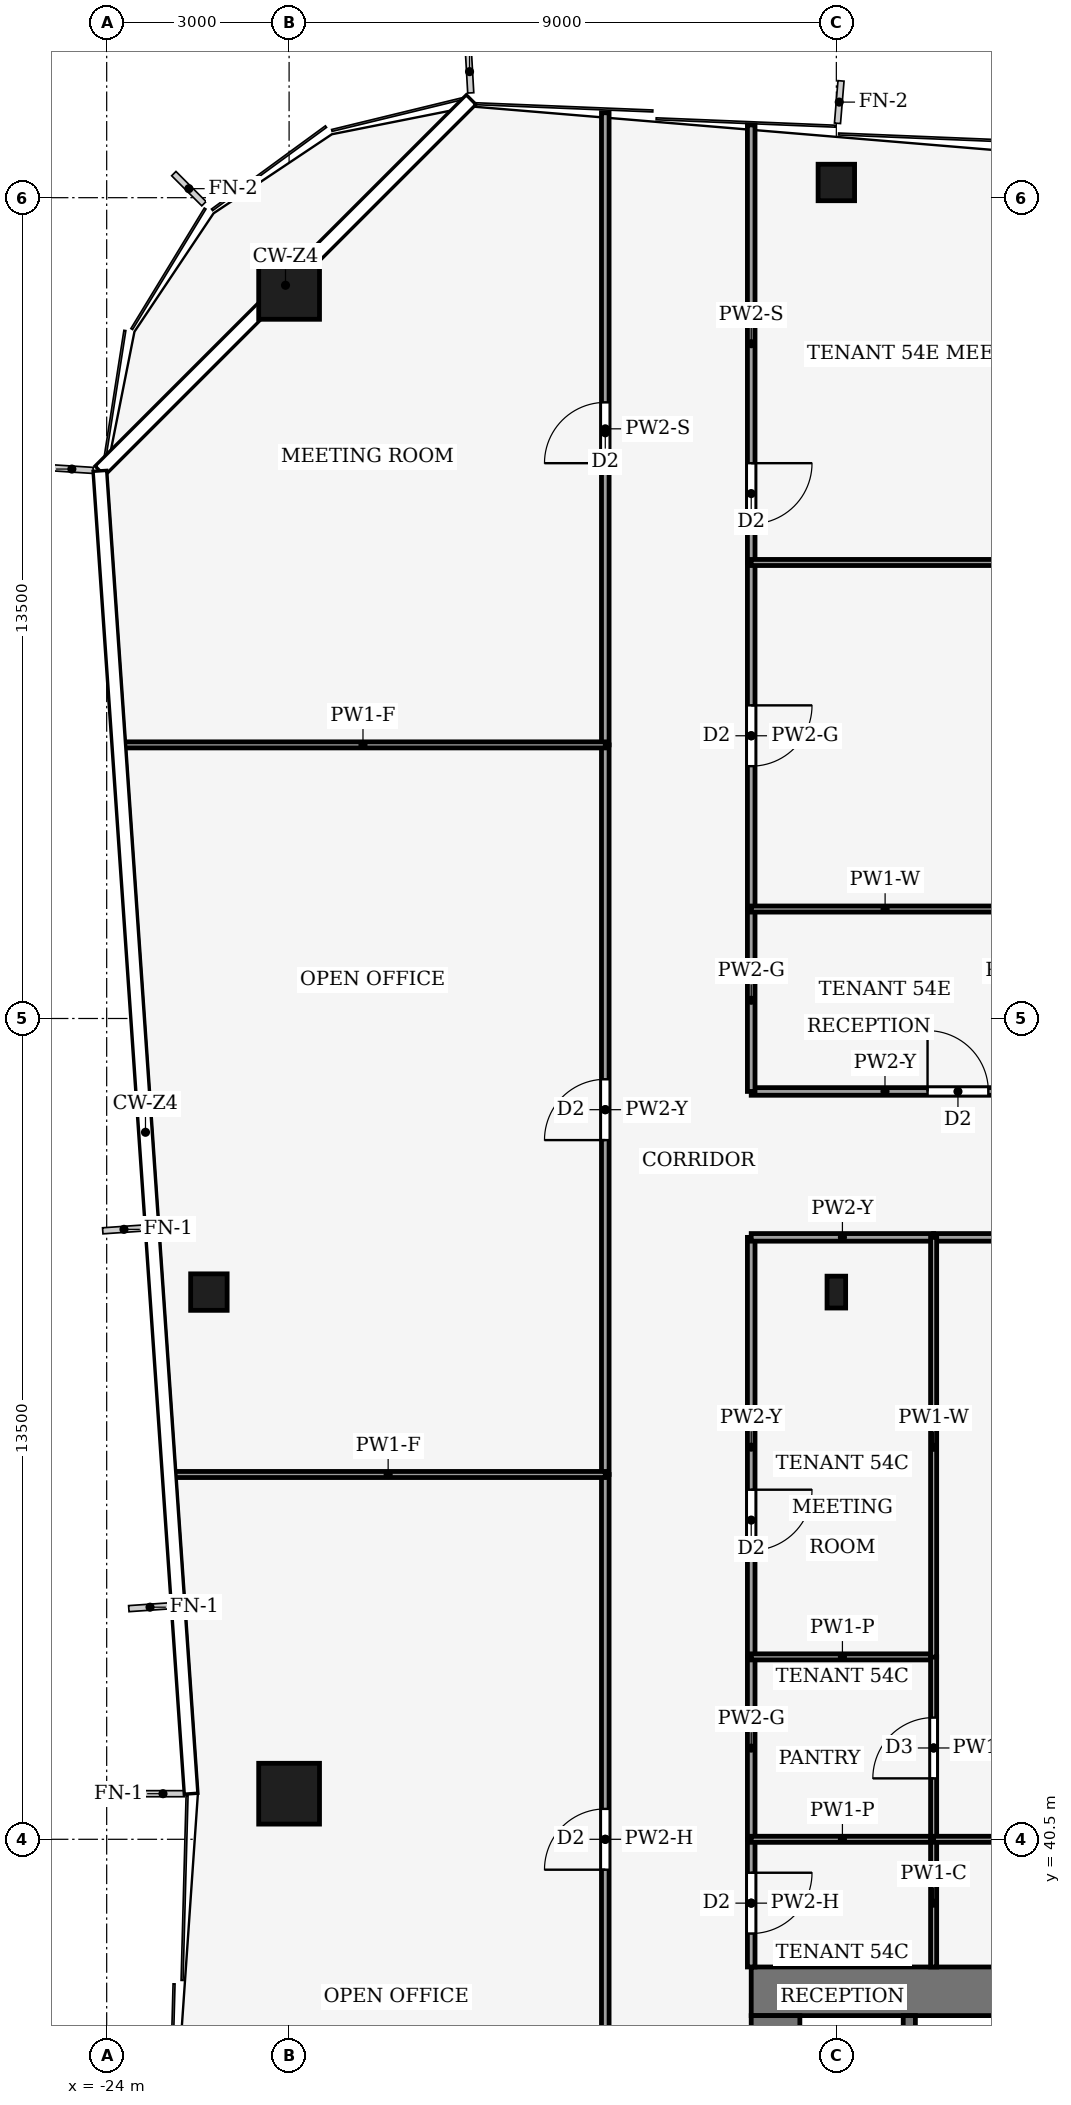
"""IFC4 building model, lengths in metres.
Left out: names, types, materials, properties, quantities, classifications, styles, units other than length and angle.
Written with IfcOpenShell. Run it as: python <this file> out.ifc"""

import sys

from ifc_helpers import new_model, si_unit, direction, frame, frame_2d, origin, origin_2d, place, context, subcontext, project, spatial, rectangle, hollow_rectangle, i_section, extrude, element, fill, save


model = new_model("IFC4")
c1 = context("Model", 3, precision=1e-05, world=origin(), true_north=direction((0.0, 1.0)))
c2 = subcontext(c1, "Body", "Model", "MODEL_VIEW")
j1 = project(units=[si_unit("LENGTHUNIT", "METRE"), si_unit("PLANEANGLEUNIT", "RADIAN")], contexts=[c1])
p1 = place(None, origin())
s1 = spatial("IfcSite", under=j1, at=p1, CompositionType="ELEMENT")
p2 = place(p1, origin())
s2 = spatial("IfcBuilding", under=s1, at=p2, CompositionType="ELEMENT")
p3 = place(p2, frame((0.0, 0.0, 238.0)))
s3 = spatial("IfcBuildingStorey", under=s2, at=p3, CompositionType="ELEMENT", Elevation=238.0)
p4 = place(p3, frame((-13.4, 38.0, -0.13), z_axis=(0.0, 0.0, 1.0), x_axis=(1.0, 0.0, 0.0)))
e1 = element("IfcWall", 1, at=p4, inside=s3, PredefinedType="SHEAR", context=c2, shape_type="SweptSolid", body=[
    extrude(rectangle(XDim=26.8, YDim=0.8, at=frame_2d((13.4, 0.0))), origin(), (0.0, 0.0, 1.0), 4.0),
])
p5 = place(p3, frame((-13.0, 18.4, -0.13), z_axis=(0.0, 0.0, 1.0), x_axis=(0.0, 1.0, 0.0)))
e2 = element("IfcWall", 2, at=p5, inside=s3, PredefinedType="SHEAR", context=c2, shape_type="SweptSolid", body=[
    extrude(rectangle(XDim=19.2, YDim=0.8, at=frame_2d((9.6, 0.0))), origin(), (0.0, 0.0, 1.0), 4.0),
])
p6 = place(p5, frame((2.8, 0.0, 0.13)))
e3 = element("IfcOpeningElement", 3, at=p6, cuts=e2, PredefinedType="OPENING", context=c2, shape_type="SweptSolid", body=[
    extrude(rectangle(XDim=2.4, YDim=2.4, at=frame_2d((1.2, 1.2))), frame((0.0, 0.41, 0.0), z_axis=(0.0, -1.0, 0.0), x_axis=(1.0, 0.0, 0.0)), (0.0, 0.0, 1.0), 0.82),
])
p7 = place(p5, frame((13.4, 0.0, 0.13)))
e4 = element("IfcOpeningElement", 4, at=p7, cuts=e2, PredefinedType="OPENING", context=c2, shape_type="SweptSolid", body=[
    extrude(rectangle(XDim=1.4, YDim=2.2, at=frame_2d((0.7, 1.1))), frame((0.0, 0.41, 0.0), z_axis=(0.0, -1.0, 0.0), x_axis=(1.0, 0.0, 0.0)), (0.0, 0.0, 1.0), 0.82),
])
for number, where, z_axis, x_axis in (
    (5, (-21.0, 66.0, 0.0), (0.0, 0.0, 1.0), (1.0, 0.0, 0.0)),
    (6, (-21.0, 41.25, 0.0), (0.0, 0.0, 1.0), (1.0, 0.0, 0.0)),
):
    element("IfcColumn", number, at=place(p3, frame(where, z_axis=z_axis, x_axis=x_axis)), inside=s3, PredefinedType="COLUMN", context=c2, shape_type="SweptSolid", body=[
        extrude(hollow_rectangle(XDim=1.0, YDim=1.0, WallThickness=0.045, at=origin_2d()), origin(), (0.0, 0.0, 1.0), 4.0),
    ])
for number, where, z_axis, x_axis in (
    (7, (-12.0, 67.75, 0.0), (0.0, 0.0, 1.0), (1.0, 0.0, 0.0)),
    (8, (-22.319, 49.5, 0.0), (0.0, 0.0, 1.0), (1.0, 0.0, 0.0)),
):
    element("IfcColumn", number, at=place(p3, frame(where, z_axis=z_axis, x_axis=x_axis)), inside=s3, PredefinedType="COLUMN", context=c2, shape_type="SweptSolid", body=[
        extrude(hollow_rectangle(XDim=0.6, YDim=0.6, WallThickness=0.025, at=origin_2d()), origin(), (0.0, 0.0, 1.0), 4.0),
    ])
p8 = place(p3, frame((-12.0, 49.5, 0.0), z_axis=(0.0, 0.0, 1.0), x_axis=(1.0, 0.0, 0.0)))
e9 = element("IfcColumn", 9, at=p8, inside=s3, PredefinedType="COLUMN", context=c2, shape_type="SweptSolid", body=[
    extrude(i_section(OverallWidth=0.306, OverallDepth=0.524, WebThickness=0.012, FlangeThickness=0.04, FilletRadius=0.027, at=origin_2d()), origin(), (0.0, 0.0, 1.0), 4.0),
])
p9 = place(p3, frame((-10.8, 34.0, 0.0), z_axis=(0.0, 0.0, 1.0), x_axis=(0.0, 1.0, 0.0)))
e10 = element("IfcWall", 10, at=p9, inside=s3, PredefinedType="PARTITIONING", context=c2, shape_type="SweptSolid", body=[
    extrude(rectangle(XDim=3.6, YDim=0.2, at=frame_2d((1.8, 0.0))), origin(), (0.0, 0.0, 1.0), 3.87),
])
p10 = place(p3, frame((-15.8, 34.5, 0.0), z_axis=(0.0, 0.0, 1.0), x_axis=(0.0, 1.0, 0.0)))
e11 = element("IfcWall", 11, at=p10, inside=s3, PredefinedType="PARTITIONING", context=c2, shape_type="SweptSolid", body=[
    extrude(rectangle(XDim=12.0, YDim=0.125, at=frame_2d((6.0, 0.0))), origin(), (0.0, 0.0, 1.0), 3.14),
])
p11 = place(p10, frame((5.5, 0.0, 0.0)))
e12 = element("IfcOpeningElement", 12, at=p11, cuts=e11, PredefinedType="OPENING", context=c2, shape_type="SweptSolid", body=[
    extrude(rectangle(XDim=1.0, YDim=2.1, at=frame_2d((0.5, 1.05))), frame((0.0, 0.073, 0.0), z_axis=(0.0, -1.0, 0.0), x_axis=(1.0, 0.0, 0.0)), (0.0, 0.0, 1.0), 0.145),
])
p12 = place(p3, frame((-15.8, 46.5, 0.0), z_axis=(0.0, 0.0, 1.0), x_axis=(0.0, 1.0, 0.0)))
e13 = element("IfcWall", 13, at=p12, inside=s3, PredefinedType="PARTITIONING", context=c2, shape_type="SweptSolid", body=[
    extrude(rectangle(XDim=12.0, YDim=0.125, at=frame_2d((6.0, 0.0))), origin(), (0.0, 0.0, 1.0), 3.24),
])
p13 = place(p12, frame((5.5, 0.0, 0.0)))
e14 = element("IfcOpeningElement", 14, at=p13, cuts=e13, PredefinedType="OPENING", context=c2, shape_type="SweptSolid", body=[
    extrude(rectangle(XDim=1.0, YDim=2.1, at=frame_2d((0.5, 1.05))), frame((0.0, 0.073, 0.0), z_axis=(0.0, -1.0, 0.0), x_axis=(1.0, 0.0, 0.0)), (0.0, 0.0, 1.0), 0.145),
])
p14 = place(p3, frame((-15.8, 58.5, 0.0), z_axis=(0.0, 0.0, 1.0), x_axis=(0.0, 1.0, 0.0)))
e15 = element("IfcWall", 15, at=p14, inside=s3, PredefinedType="PARTITIONING", context=c2, shape_type="SweptSolid", body=[
    extrude(rectangle(XDim=10.397, YDim=0.125, at=frame_2d((5.198, 0.0))), origin(), (0.0, 0.0, 1.0), 3.04),
])
p15 = place(p14, frame((4.633, 0.0, 0.0)))
e16 = element("IfcOpeningElement", 16, at=p15, cuts=e15, PredefinedType="OPENING", context=c2, shape_type="SweptSolid", body=[
    extrude(rectangle(XDim=1.0, YDim=2.1, at=frame_2d((0.5, 1.05))), frame((0.0, 0.073, 0.0), z_axis=(0.0, -1.0, 0.0), x_axis=(1.0, 0.0, 0.0)), (0.0, 0.0, 1.0), 0.145),
])
p16 = place(p3, frame((-13.4, 40.5, 0.0), z_axis=(0.0, 0.0, 1.0), x_axis=(0.0, -1.0, 0.0)))
e17 = element("IfcWall", 17, at=p16, inside=s3, PredefinedType="PARTITIONING", context=c2, shape_type="SweptSolid", body=[
    extrude(rectangle(XDim=2.1, YDim=0.125, at=frame_2d((1.05, 0.0))), origin(), (0.0, 0.0, 1.0), 3.14),
])
p17 = place(p16, frame((0.55, 0.0, 0.0)))
e18 = element("IfcOpeningElement", 18, at=p17, cuts=e17, PredefinedType="OPENING", context=c2, shape_type="SweptSolid", body=[
    extrude(rectangle(XDim=1.0, YDim=2.1, at=frame_2d((0.5, 1.05))), frame((0.0, 0.073, 0.0), z_axis=(0.0, -1.0, 0.0), x_axis=(1.0, 0.0, 0.0)), (0.0, 0.0, 1.0), 0.145),
])
p18 = place(p3, frame((-13.4, 40.5, 0.0), z_axis=(0.0, 0.0, 1.0), x_axis=(0.0, 1.0, 0.0)))
e19 = element("IfcWall", 19, at=p18, inside=s3, PredefinedType="PARTITIONING", context=c2, shape_type="SweptSolid", body=[
    extrude(rectangle(XDim=3.0, YDim=0.125, at=frame_2d((1.5, 0.0))), origin(), (0.0, 0.0, 1.0), 3.87),
])
p19 = place(p3, frame((-13.4, 50.4, 0.0), z_axis=(0.0, 0.0, 1.0), x_axis=(0.0, -1.0, 0.0)))
e20 = element("IfcWall", 20, at=p19, inside=s3, PredefinedType="PARTITIONING", context=c2, shape_type="SweptSolid", body=[
    extrude(rectangle(XDim=6.9, YDim=0.125, at=frame_2d((3.45, 0.0))), origin(), (0.0, 0.0, 1.0), 3.24),
])
p20 = place(p19, frame((4.15, 0.0, 0.0)))
e21 = element("IfcOpeningElement", 21, at=p20, cuts=e20, PredefinedType="OPENING", context=c2, shape_type="SweptSolid", body=[
    extrude(rectangle(XDim=1.0, YDim=2.1, at=frame_2d((0.5, 1.05))), frame((0.0, 0.073, 0.0), z_axis=(0.0, -1.0, 0.0), x_axis=(1.0, 0.0, 0.0)), (0.0, 0.0, 1.0), 0.145),
])
p21 = place(p3, frame((-10.4, 50.4, 0.0), z_axis=(0.0, 0.0, 1.0), x_axis=(-1.0, 0.0, 0.0)))
e22 = element("IfcWall", 22, at=p21, inside=s3, PredefinedType="PARTITIONING", context=c2, shape_type="SweptSolid", body=[
    extrude(rectangle(XDim=3.0, YDim=0.125, at=frame_2d((1.5, 0.0))), origin(), (0.0, 0.0, 1.0), 3.24),
])
p22 = place(p3, frame((0.0, 50.4, 0.0), z_axis=(0.0, 0.0, 1.0), x_axis=(-1.0, 0.0, 0.0)))
e23 = element("IfcWall", 23, at=p22, inside=s3, PredefinedType="PARTITIONING", context=c2, shape_type="SweptSolid", body=[
    extrude(rectangle(XDim=10.4, YDim=0.125, at=frame_2d((5.2, 0.0))), origin(), (0.0, 0.0, 1.0), 3.24),
])
p23 = place(p22, frame((4.7, 0.0, 0.0)))
e24 = element("IfcOpeningElement", 24, at=p23, cuts=e23, PredefinedType="OPENING", context=c2, shape_type="SweptSolid", body=[
    extrude(rectangle(XDim=1.0, YDim=2.1, at=frame_2d((0.5, 1.05))), frame((0.0, 0.073, 0.0), z_axis=(0.0, -1.0, 0.0), x_axis=(1.0, 0.0, 0.0)), (0.0, 0.0, 1.0), 0.145),
])
p24 = place(p3, frame((-13.4, 52.8, 0.0), z_axis=(0.0, 0.0, 1.0), x_axis=(1.0, 0.0, 0.0)))
e25 = element("IfcWall", 25, at=p24, inside=s3, PredefinedType="PARTITIONING", context=c2, shape_type="SweptSolid", body=[
    extrude(rectangle(XDim=4.4, YDim=0.125, at=frame_2d((2.2, 0.0))), origin(), (0.0, 0.0, 1.0), 3.24),
])
p25 = place(p24, frame((2.9, 0.0, 0.0)))
e26 = element("IfcOpeningElement", 26, at=p25, cuts=e25, PredefinedType="OPENING", context=c2, shape_type="SweptSolid", body=[
    extrude(rectangle(XDim=1.0, YDim=2.1, at=frame_2d((0.5, 1.05))), frame((0.0, 0.073, 0.0), z_axis=(0.0, -1.0, 0.0), x_axis=(1.0, 0.0, 0.0)), (0.0, 0.0, 1.0), 0.145),
])
p26 = place(p3, frame((-13.4, 52.8, 0.0), z_axis=(0.0, 0.0, 1.0), x_axis=(0.0, 1.0, 0.0)))
e27 = element("IfcWall", 27, at=p26, inside=s3, PredefinedType="PARTITIONING", context=c2, shape_type="SweptSolid", body=[
    extrude(rectangle(XDim=3.0, YDim=0.125, at=frame_2d((1.5, 0.0))), origin(), (0.0, 0.0, 1.0), 3.87),
])
p27 = place(p3, frame((-13.4, 61.5, 0.0), z_axis=(0.0, 0.0, 1.0), x_axis=(0.0, -1.0, 0.0)))
e28 = element("IfcWall", 28, at=p27, inside=s3, PredefinedType="PARTITIONING", context=c2, shape_type="SweptSolid", body=[
    extrude(rectangle(XDim=5.7, YDim=0.125, at=frame_2d((2.85, 0.0))), origin(), (0.0, 0.0, 1.0), 3.87),
])
p28 = place(p27, frame((2.35, 0.0, 0.0)))
e29 = element("IfcOpeningElement", 29, at=p28, cuts=e28, PredefinedType="OPENING", context=c2, shape_type="SweptSolid", body=[
    extrude(rectangle(XDim=1.0, YDim=2.1, at=frame_2d((0.5, 1.05))), frame((0.0, 0.073, 0.0), z_axis=(0.0, -1.0, 0.0), x_axis=(1.0, 0.0, 0.0)), (0.0, 0.0, 1.0), 0.145),
])
p29 = place(p3, frame((-13.4, 68.697, 0.0), z_axis=(0.0, 0.0, 1.0), x_axis=(0.0, -1.0, 0.0)))
e30 = element("IfcWall", 30, at=p29, inside=s3, PredefinedType="PARTITIONING", context=c2, shape_type="SweptSolid", body=[
    extrude(rectangle(XDim=7.197, YDim=0.125, at=frame_2d((3.598, 0.0))), origin(), (0.0, 0.0, 1.0), 3.04),
])
p30 = place(p29, frame((5.563, 0.0, 0.0)))
e31 = element("IfcOpeningElement", 31, at=p30, cuts=e30, PredefinedType="OPENING", context=c2, shape_type="SweptSolid", body=[
    extrude(rectangle(XDim=1.0, YDim=2.1, at=frame_2d((0.5, 1.05))), frame((0.0, 0.073, 0.0), z_axis=(0.0, -1.0, 0.0), x_axis=(1.0, 0.0, 0.0)), (0.0, 0.0, 1.0), 0.145),
])
p31 = place(p3, frame((-15.8, 46.5, 0.0), z_axis=(0.0, 0.0, 1.0), x_axis=(-1.0, 0.0, 0.0)))
e32 = element("IfcWall", 32, at=p31, inside=s3, PredefinedType="PARTITIONING", context=c2, shape_type="SweptSolid", body=[
    extrude(rectangle(XDim=7.142, YDim=0.1, at=frame_2d((3.571, 0.0))), origin(), (0.0, 0.0, 1.0), 3.04),
])
p32 = place(p3, frame((-15.8, 58.5, 0.0), z_axis=(0.0, 0.0, 1.0), x_axis=(-1.0, 0.0, 0.0)))
e33 = element("IfcWall", 33, at=p32, inside=s3, PredefinedType="PARTITIONING", context=c2, shape_type="SweptSolid", body=[
    extrude(rectangle(XDim=7.97, YDim=0.1, at=frame_2d((3.985, 0.0))), origin(), (0.0, 0.0, 1.0), 3.04),
])
p33 = place(p3, frame((-10.4, 40.5, 0.0), z_axis=(0.0, 0.0, 1.0), x_axis=(-1.0, 0.0, 0.0)))
e34 = element("IfcWall", 34, at=p33, inside=s3, PredefinedType="PARTITIONING", context=c2, shape_type="SweptSolid", body=[
    extrude(rectangle(XDim=3.0, YDim=0.1, at=frame_2d((1.5, 0.0))), origin(), (0.0, 0.0, 1.0), 3.44),
])
p34 = place(p3, frame((-10.4, 38.4, 0.0), z_axis=(0.0, 0.0, 1.0), x_axis=(0.0, 1.0, 0.0)))
e35 = element("IfcWall", 35, at=p34, inside=s3, PredefinedType="PARTITIONING", context=c2, shape_type="SweptSolid", body=[
    extrude(rectangle(XDim=2.1, YDim=0.1, at=frame_2d((1.05, 0.0))), origin(), (0.0, 0.0, 1.0), 3.87),
])
p35 = place(p3, frame((-10.4, 43.5, 0.0), z_axis=(0.0, 0.0, 1.0), x_axis=(-1.0, 0.0, 0.0)))
e36 = element("IfcWall", 36, at=p35, inside=s3, PredefinedType="PARTITIONING", context=c2, shape_type="SweptSolid", body=[
    extrude(rectangle(XDim=3.0, YDim=0.1, at=frame_2d((1.5, 0.0))), origin(), (0.0, 0.0, 1.0), 3.44),
])
p36 = place(p3, frame((-10.4, 40.5, 0.0), z_axis=(0.0, 0.0, 1.0), x_axis=(0.0, 1.0, 0.0)))
e37 = element("IfcWall", 37, at=p36, inside=s3, PredefinedType="PARTITIONING", context=c2, shape_type="SweptSolid", body=[
    extrude(rectangle(XDim=3.004, YDim=0.1, at=frame_2d((1.502, 0.0))), origin(), (0.0, 0.0, 1.0), 3.87),
])
p37 = place(p36, frame((1.002, 0.0, 0.0)))
e38 = element("IfcOpeningElement", 38, at=p37, cuts=e37, PredefinedType="OPENING", context=c2, shape_type="SweptSolid", body=[
    extrude(rectangle(XDim=1.0, YDim=2.1, at=frame_2d((0.5, 1.05))), frame((0.0, 0.06, 0.0), z_axis=(0.0, -1.0, 0.0), x_axis=(1.0, 0.0, 0.0)), (0.0, 0.0, 1.0), 0.12),
])
p38 = place(p3, frame((-10.4, 43.496, 0.0), z_axis=(0.0, 0.0, 1.0), x_axis=(0.0, 1.0, 0.0)))
e39 = element("IfcWall", 39, at=p38, inside=s3, PredefinedType="PARTITIONING", context=c2, shape_type="SweptSolid", body=[
    extrude(rectangle(XDim=6.904, YDim=0.1, at=frame_2d((3.452, 0.0))), origin(), (0.0, 0.0, 1.0), 3.24),
])
p39 = place(p3, frame((0.0, 40.5, 0.0), z_axis=(0.0, 0.0, 1.0), x_axis=(-1.0, 0.0, 0.0)))
e40 = element("IfcWall", 40, at=p39, inside=s3, PredefinedType="PARTITIONING", context=c2, shape_type="SweptSolid", body=[
    extrude(rectangle(XDim=10.4, YDim=0.1, at=frame_2d((5.2, 0.0))), origin(), (0.0, 0.0, 1.0), 3.44),
])
p40 = place(p39, frame((4.7, 0.0, 0.0)))
e41 = element("IfcOpeningElement", 41, at=p40, cuts=e40, PredefinedType="OPENING", context=c2, shape_type="SweptSolid", body=[
    extrude(rectangle(XDim=1.0, YDim=2.1, at=frame_2d((0.5, 1.05))), frame((0.0, 0.06, 0.0), z_axis=(0.0, -1.0, 0.0), x_axis=(1.0, 0.0, 0.0)), (0.0, 0.0, 1.0), 0.12),
])
p41 = place(p3, frame((-8.996, 55.8, 0.0), z_axis=(0.0, 0.0, 1.0), x_axis=(-1.0, 0.0, 0.0)))
e42 = element("IfcWall", 42, at=p41, inside=s3, PredefinedType="PARTITIONING", context=c2, shape_type="SweptSolid", body=[
    extrude(rectangle(XDim=4.404, YDim=0.1, at=frame_2d((2.202, 0.0))), origin(), (0.0, 0.0, 1.0), 3.24),
])
p42 = place(p3, frame((0.0, 61.5, 0.0), z_axis=(0.0, 0.0, 1.0), x_axis=(-1.0, 0.0, 0.0)))
e43 = element("IfcWall", 43, at=p42, inside=s3, PredefinedType="PARTITIONING", context=c2, shape_type="SweptSolid", body=[
    extrude(rectangle(XDim=13.4, YDim=0.1, at=frame_2d((6.7, 0.0))), origin(), (0.0, 0.0, 1.0), 3.24),
])
p43 = place(p11, origin())
e44 = element("IfcDoor", 44, at=p43, inside=s3, OperationType="SINGLE_SWING_RIGHT", PredefinedType="DOOR", context=c2, shape_type="SweptSolid", body=[
    extrude(rectangle(XDim=1.0, YDim=2.1, at=frame_2d((0.5, 1.05))), frame((0.0, 0.025, 0.0), z_axis=(0.0, -1.0, 0.0), x_axis=(1.0, 0.0, 0.0)), (0.0, 0.0, 1.0), 0.05),
])
fill(e12, e44)
p44 = place(p13, origin())
e45 = element("IfcDoor", 45, at=p44, inside=s3, OperationType="SINGLE_SWING_LEFT", PredefinedType="DOOR", context=c2, shape_type="SweptSolid", body=[
    extrude(rectangle(XDim=1.0, YDim=2.1, at=frame_2d((0.5, 1.05))), frame((0.0, 0.025, 0.0), z_axis=(0.0, -1.0, 0.0), x_axis=(1.0, 0.0, 0.0)), (0.0, 0.0, 1.0), 0.05),
])
fill(e14, e45)
p45 = place(p15, origin())
e46 = element("IfcDoor", 46, at=p45, inside=s3, OperationType="SINGLE_SWING_LEFT", PredefinedType="DOOR", context=c2, shape_type="SweptSolid", body=[
    extrude(rectangle(XDim=1.0, YDim=2.1, at=frame_2d((0.5, 1.05))), frame((0.0, 0.025, 0.0), z_axis=(0.0, -1.0, 0.0), x_axis=(1.0, 0.0, 0.0)), (0.0, 0.0, 1.0), 0.05),
])
fill(e16, e46)
p46 = place(p17, origin())
e47 = element("IfcDoor", 47, at=p46, inside=s3, OperationType="SINGLE_SWING_LEFT", PredefinedType="DOOR", context=c2, shape_type="SweptSolid", body=[
    extrude(rectangle(XDim=1.0, YDim=2.1, at=frame_2d((0.5, 1.05))), frame((0.0, 0.025, 0.0), z_axis=(0.0, -1.0, 0.0), x_axis=(1.0, 0.0, 0.0)), (0.0, 0.0, 1.0), 0.05),
])
fill(e18, e47)
p47 = place(p20, origin())
e48 = element("IfcDoor", 48, at=p47, inside=s3, OperationType="SINGLE_SWING_RIGHT", PredefinedType="DOOR", context=c2, shape_type="SweptSolid", body=[
    extrude(rectangle(XDim=1.0, YDim=2.1, at=frame_2d((0.5, 1.05))), frame((0.0, 0.025, 0.0), z_axis=(0.0, -1.0, 0.0), x_axis=(1.0, 0.0, 0.0)), (0.0, 0.0, 1.0), 0.05),
])
fill(e21, e48)
p48 = place(p25, origin())
e49 = element("IfcDoor", 49, at=p48, inside=s3, OperationType="SINGLE_SWING_RIGHT", PredefinedType="DOOR", context=c2, shape_type="SweptSolid", body=[
    extrude(rectangle(XDim=1.0, YDim=2.1, at=frame_2d((0.5, 1.05))), frame((0.0, 0.025, 0.0), z_axis=(0.0, -1.0, 0.0), x_axis=(1.0, 0.0, 0.0)), (0.0, 0.0, 1.0), 0.05),
])
fill(e26, e49)
p49 = place(p28, origin())
e50 = element("IfcDoor", 50, at=p49, inside=s3, OperationType="SINGLE_SWING_RIGHT", PredefinedType="DOOR", context=c2, shape_type="SweptSolid", body=[
    extrude(rectangle(XDim=1.0, YDim=2.1, at=frame_2d((0.5, 1.05))), frame((0.0, 0.025, 0.0), z_axis=(0.0, -1.0, 0.0), x_axis=(1.0, 0.0, 0.0)), (0.0, 0.0, 1.0), 0.05),
])
fill(e29, e50)
p50 = place(p30, origin())
e51 = element("IfcDoor", 51, at=p50, inside=s3, OperationType="SINGLE_SWING_RIGHT", PredefinedType="DOOR", context=c2, shape_type="SweptSolid", body=[
    extrude(rectangle(XDim=1.0, YDim=2.1, at=frame_2d((0.5, 1.05))), frame((0.0, 0.025, 0.0), z_axis=(0.0, -1.0, 0.0), x_axis=(1.0, 0.0, 0.0)), (0.0, 0.0, 1.0), 0.05),
])
fill(e31, e51)
p51 = place(p37, origin())
e52 = element("IfcDoor", 52, at=p51, inside=s3, OperationType="SINGLE_SWING_LEFT", PredefinedType="DOOR", context=c2, shape_type="SweptSolid", body=[
    extrude(rectangle(XDim=1.0, YDim=2.1, at=frame_2d((0.5, 1.05))), frame((0.0, 0.025, 0.0), z_axis=(0.0, -1.0, 0.0), x_axis=(1.0, 0.0, 0.0)), (0.0, 0.0, 1.0), 0.05),
])
fill(e38, e52)
save(model, sys.argv[1])
